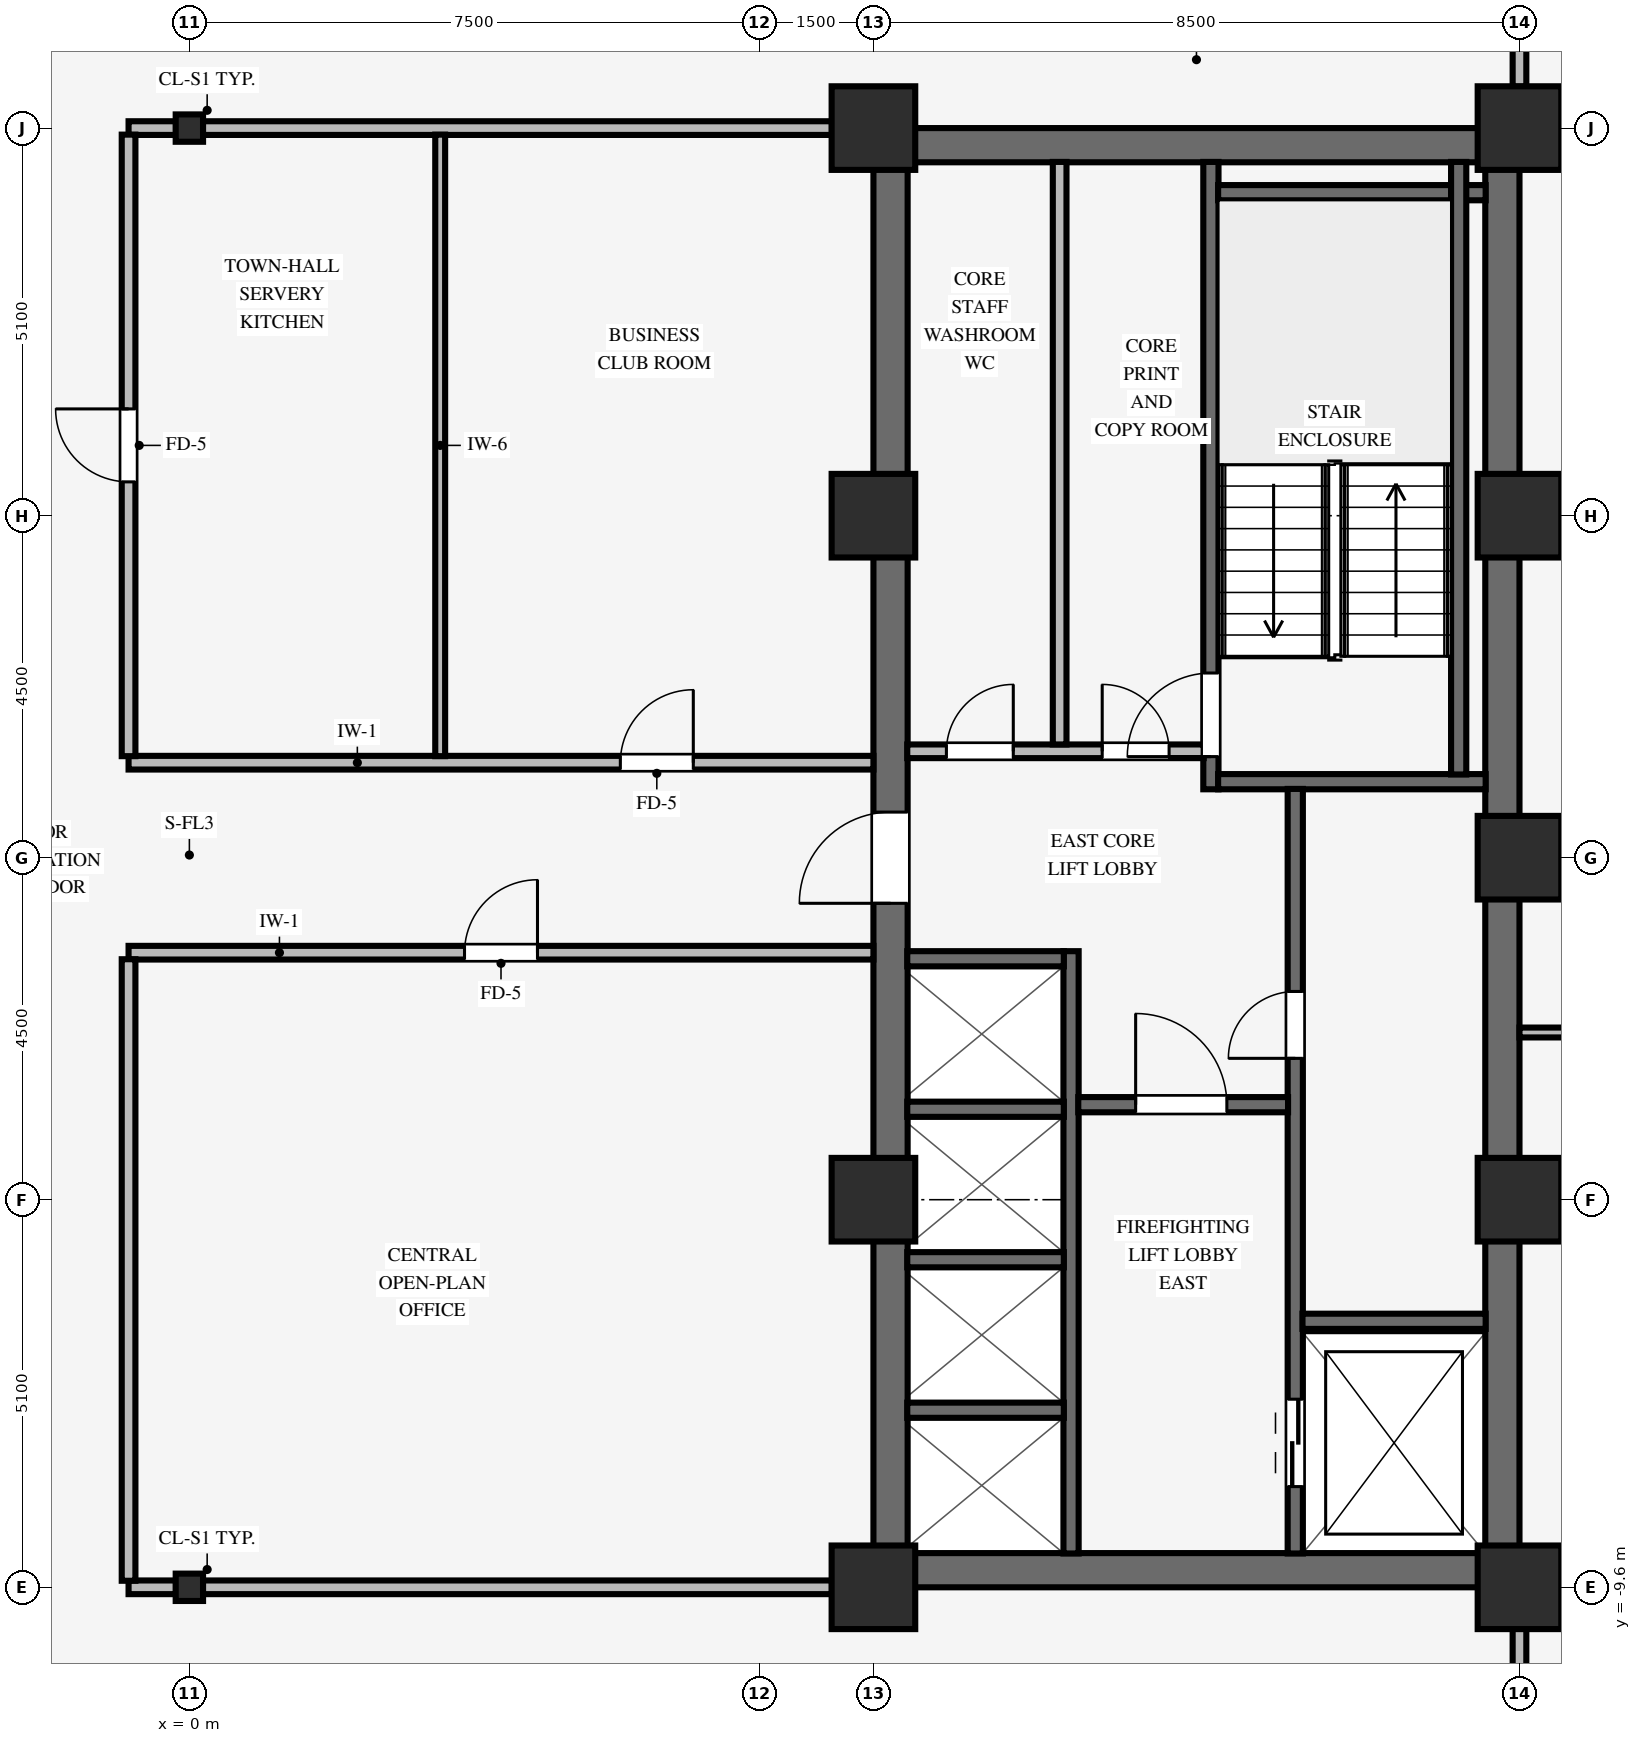
"""IFC4 building model, lengths in metres.
Left out: names, types, materials, properties, quantities, classifications, styles, units other than length and angle.
Written with IfcOpenShell. Run it as: python <this file> out.ifc"""

import sys

from ifc_helpers import new_model, si_unit, direction, frame, frame_2d, origin, origin_2d, place, context, subcontext, project, spatial, rectangle, i_section, extrude, source, transform, mapped, element, fill, save


model = new_model("IFC4")
c1 = context("Model", 3, precision=1e-05, world=origin(), true_north=direction((0.0, 1.0)))
c2 = subcontext(c1, "Body", "Model", "MODEL_VIEW")
j1 = project(units=[si_unit("LENGTHUNIT", "METRE"), si_unit("PLANEANGLEUNIT", "RADIAN")], contexts=[c1])
p1 = place(None, origin())
s1 = spatial("IfcSite", under=j1, at=p1, CompositionType="ELEMENT")
p2 = place(p1, origin())
s2 = spatial("IfcBuilding", under=s1, at=p2, CompositionType="ELEMENT")
p3 = place(p2, frame((0.0, 0.0, 56.8)))
s3 = spatial("IfcBuildingStorey", under=s2, at=p3, CompositionType="ELEMENT", Elevation=56.8)
for number, where, z_axis, x_axis in (
    (1, (9.0, -9.375, 0.0), (0.0, 0.0, 1.0), (1.0, 0.0, 0.0)),
    (2, (9.0, 9.375, 0.0), (0.0, 0.0, 1.0), (1.0, 0.0, 0.0)),
):
    element("IfcWall", number, at=place(p3, frame(where, z_axis=z_axis, x_axis=x_axis)), inside=s3, PredefinedType="SHEAR", context=c2, shape_type="SweptSolid", body=[
        extrude(rectangle(XDim=8.5, YDim=0.45, at=frame_2d((4.25, 0.0))), origin(), (0.0, 0.0, 1.0), 3.37),
    ])
p4 = place(p3, frame((9.225, -9.155, 0.0), z_axis=(0.0, 0.0, 1.0), x_axis=(0.0, 1.0, 0.0)))
e3 = element("IfcWall", 3, at=p4, inside=s3, PredefinedType="SHEAR", context=c2, shape_type="SweptSolid", body=[
    extrude(rectangle(XDim=18.31, YDim=0.45, at=frame_2d((9.155, 0.0))), origin(), (0.0, 0.0, 1.0), 3.37),
])
p5 = place(p4, frame((8.555, 0.0, 0.0)))
e4 = element("IfcOpeningElement", 4, at=p5, cuts=e3, PredefinedType="OPENING", context=c2, shape_type="SweptSolid", body=[
    extrude(rectangle(XDim=1.2, YDim=2.15, at=frame_2d((0.6, 1.075))), frame((0.0, 0.235, 0.0), z_axis=(0.0, -1.0, 0.0), x_axis=(1.0, 0.0, 0.0)), (0.0, 0.0, 1.0), 0.47),
])
p6 = place(p3, frame((17.275, -9.155, 0.0), z_axis=(0.0, 0.0, 1.0), x_axis=(0.0, 1.0, 0.0)))
e5 = element("IfcWall", 5, at=p6, inside=s3, PredefinedType="SHEAR", context=c2, shape_type="SweptSolid", body=[
    extrude(rectangle(XDim=18.31, YDim=0.45, at=frame_2d((9.155, 0.0))), origin(), (0.0, 0.0, 1.0), 3.37),
])
for number, where, z_axis, x_axis in (
    (6, (9.0, -9.6, 0.0), (0.0, 0.0, 1.0), (1.0, 0.0, 0.0)),
    (7, (9.0, -4.5, 0.0), (0.0, 0.0, 1.0), (1.0, 0.0, 0.0)),
    (8, (9.0, 4.5, 0.0), (0.0, 0.0, 1.0), (1.0, 0.0, 0.0)),
    (9, (9.0, 9.6, 0.0), (0.0, 0.0, 1.0), (1.0, 0.0, 0.0)),
    (10, (17.5, -9.6, 0.0), (0.0, 0.0, 1.0), (1.0, 0.0, 0.0)),
    (11, (17.5, -4.5, 0.0), (0.0, 0.0, 1.0), (1.0, 0.0, 0.0)),
    (12, (17.5, 4.5, 0.0), (0.0, 0.0, 1.0), (1.0, 0.0, 0.0)),
    (13, (17.5, 9.6, 0.0), (0.0, 0.0, 1.0), (1.0, 0.0, 0.0)),
    (14, (17.5, 0.0, 0.0), (0.0, 0.0, 1.0), (1.0, 0.0, 0.0)),
):
    element("IfcColumn", number, at=place(p3, frame(where, z_axis=z_axis, x_axis=x_axis)), inside=s3, PredefinedType="COLUMN", context=c2, shape_type="SweptSolid", body=[
        extrude(rectangle(XDim=1.1, YDim=1.1, at=origin_2d()), origin(), (0.0, 0.0, 1.0), 3.37),
    ])
for number, where, z_axis, x_axis in (
    (15, (0.0, -9.6, 0.0), (0.0, 0.0, 1.0), (1.0, 0.0, 0.0)),
    (16, (0.0, 9.6, 0.0), (0.0, 0.0, 1.0), (1.0, 0.0, 0.0)),
):
    element("IfcColumn", number, at=place(p3, frame(where, z_axis=z_axis, x_axis=x_axis)), inside=s3, PredefinedType="COLUMN", context=c2, shape_type="SweptSolid", body=[
        extrude(i_section(OverallWidth=0.36, OverallDepth=0.36, WebThickness=0.021, FlangeThickness=0.021, FilletRadius=0.018, at=origin_2d()), origin(), (0.0, 0.0, 1.0), 3.37),
    ])
p7 = place(p3, frame((13.44, 0.9, 0.0), z_axis=(0.0, 0.0, 1.0), x_axis=(0.0, 1.0, 0.0)))
e17 = element("IfcWall", 17, at=p7, inside=s3, PredefinedType="SHEAR", context=c2, shape_type="SweptSolid", body=[
    extrude(rectangle(XDim=8.255, YDim=0.2, at=frame_2d((4.127, 0.0))), origin(), (0.0, 0.0, 1.0), 3.37),
])
p8 = place(p7, frame((0.43, 0.0, 0.0)))
e18 = element("IfcOpeningElement", 18, at=p8, cuts=e17, PredefinedType="OPENING", context=c2, shape_type="SweptSolid", body=[
    extrude(rectangle(XDim=1.1, YDim=2.15, at=frame_2d((0.55, 1.075))), frame((0.0, 0.11, 0.0), z_axis=(0.0, -1.0, 0.0), x_axis=(1.0, 0.0, 0.0)), (0.0, 0.0, 1.0), 0.22),
])
for number, where, z_axis, x_axis in (
    (19, (13.535, 1.0, 0.0), (0.0, 0.0, 1.0), (1.0, 0.0, 0.0)),
    (20, (13.535, 8.75, 0.0), (0.0, 0.0, 1.0), (1.0, 0.0, 0.0)),
):
    element("IfcWall", number, at=place(p3, frame(where, z_axis=z_axis, x_axis=x_axis)), inside=s3, PredefinedType="SHEAR", context=c2, shape_type="SweptSolid", body=[
        extrude(rectangle(XDim=3.52, YDim=0.2, at=frame_2d((1.76, 0.0))), origin(), (0.0, 0.0, 1.0), 3.37),
    ])
p9 = place(p3, frame((16.7, 1.095, 0.0), z_axis=(0.0, 0.0, 1.0), x_axis=(0.0, 1.0, 0.0)))
e21 = element("IfcWall", 21, at=p9, inside=s3, PredefinedType="SHEAR", context=c2, shape_type="SweptSolid", body=[
    extrude(rectangle(XDim=8.06, YDim=0.2, at=frame_2d((4.03, 0.0))), origin(), (0.0, 0.0, 1.0), 3.37),
])
p10 = place(p3, frame((14.55, -9.155, 0.0), z_axis=(0.0, 0.0, 1.0), x_axis=(0.0, 1.0, 0.0)))
e22 = element("IfcWall", 22, at=p10, inside=s3, PredefinedType="SHEAR", context=c2, shape_type="SweptSolid", body=[
    extrude(rectangle(XDim=10.06, YDim=0.2, at=frame_2d((5.03, 0.0))), origin(), (0.0, 0.0, 1.0), 3.37),
])
p11 = place(p10, frame((6.515, 0.0, 0.0)))
e23 = element("IfcOpeningElement", 23, at=p11, cuts=e22, PredefinedType="OPENING", context=c2, shape_type="SweptSolid", body=[
    extrude(rectangle(XDim=0.88, YDim=2.1, at=frame_2d((0.44, 1.05))), frame((0.0, 0.11, 0.0), z_axis=(0.0, -1.0, 0.0), x_axis=(1.0, 0.0, 0.0)), (0.0, 0.0, 1.0), 0.22),
])
p12 = place(p10, frame((0.88, 0.0, 0.0)))
e24 = element("IfcOpeningElement", 24, at=p12, cuts=e22, PredefinedType="OPENING", context=c2, shape_type="SweptSolid", body=[
    extrude(rectangle(XDim=1.15, YDim=2.15, at=frame_2d((0.575, 1.075))), frame((0.0, 0.11, 0.0), z_axis=(0.0, -1.0, 0.0), x_axis=(1.0, 0.0, 0.0)), (0.0, 0.0, 1.0), 0.22),
])
p13 = place(p3, frame((14.645, -6.1, 0.0), z_axis=(0.0, 0.0, 1.0), x_axis=(1.0, 0.0, 0.0)))
e25 = element("IfcWall", 25, at=p13, inside=s3, PredefinedType="SHEAR", context=c2, shape_type="SweptSolid", body=[
    extrude(rectangle(XDim=2.41, YDim=0.2, at=frame_2d((1.205, 0.0))), origin(), (0.0, 0.0, 1.0), 3.37),
])
p14 = place(p3, frame((11.6, -9.155, 0.0), z_axis=(0.0, 0.0, 1.0), x_axis=(0.0, 1.0, 0.0)))
e26 = element("IfcWall", 26, at=p14, inside=s3, PredefinedType="SHEAR", context=c2, shape_type="SweptSolid", body=[
    extrude(rectangle(XDim=7.925, YDim=0.2, at=frame_2d((3.962, 0.0))), origin(), (0.0, 0.0, 1.0), 3.37),
])
p15 = place(p3, frame((11.695, -3.25, 0.0), z_axis=(0.0, 0.0, 1.0), x_axis=(1.0, 0.0, 0.0)))
e27 = element("IfcWall", 27, at=p15, inside=s3, PredefinedType="SHEAR", context=c2, shape_type="SweptSolid", body=[
    extrude(rectangle(XDim=2.76, YDim=0.2, at=frame_2d((1.38, 0.0))), origin(), (0.0, 0.0, 1.0), 3.37),
])
p16 = place(p15, frame((0.755, 0.0, 0.0)))
e28 = element("IfcOpeningElement", 28, at=p16, cuts=e27, PredefinedType="OPENING", context=c2, shape_type="SweptSolid", body=[
    extrude(rectangle(XDim=1.2, YDim=2.15, at=frame_2d((0.6, 1.075))), frame((0.0, 0.11, 0.0), z_axis=(0.0, -1.0, 0.0), x_axis=(1.0, 0.0, 0.0)), (0.0, 0.0, 1.0), 0.22),
])
for number, where, z_axis, x_axis in (
    (29, (9.445, -7.27, 0.0), (0.0, 0.0, 1.0), (1.0, 0.0, 0.0)),
    (30, (9.445, -5.29, 0.0), (0.0, 0.0, 1.0), (1.0, 0.0, 0.0)),
    (31, (9.445, -3.31, 0.0), (0.0, 0.0, 1.0), (1.0, 0.0, 0.0)),
    (32, (9.445, -1.33, 0.0), (0.0, 0.0, 1.0), (1.0, 0.0, 0.0)),
):
    element("IfcWall", number, at=place(p3, frame(where, z_axis=z_axis, x_axis=x_axis)), inside=s3, PredefinedType="SHEAR", context=c2, shape_type="SweptSolid", body=[
        extrude(rectangle(XDim=2.06, YDim=0.2, at=frame_2d((1.03, 0.0))), origin(), (0.0, 0.0, 1.0), 3.37),
    ])
p17 = place(p3, frame((9.445, 1.4, 0.0), z_axis=(0.0, 0.0, 1.0), x_axis=(1.0, 0.0, 0.0)))
e33 = element("IfcWall", 33, at=p17, inside=s3, PredefinedType="PARTITIONING", context=c2, shape_type="SweptSolid", body=[
    extrude(rectangle(XDim=3.9, YDim=0.18, at=frame_2d((1.95, 0.0))), origin(), (0.0, 0.0, 1.0), 3.36),
])
p18 = place(p17, frame((0.515, 0.0, 0.0)))
e34 = element("IfcOpeningElement", 34, at=p18, cuts=e33, PredefinedType="OPENING", context=c2, shape_type="SweptSolid", body=[
    extrude(rectangle(XDim=0.88, YDim=2.1, at=frame_2d((0.44, 1.05))), frame((0.0, 0.1, 0.0), z_axis=(0.0, -1.0, 0.0), x_axis=(1.0, 0.0, 0.0)), (0.0, 0.0, 1.0), 0.2),
])
p19 = place(p17, frame((2.565, 0.0, 0.0)))
e35 = element("IfcOpeningElement", 35, at=p19, cuts=e33, PredefinedType="OPENING", context=c2, shape_type="SweptSolid", body=[
    extrude(rectangle(XDim=0.88, YDim=2.1, at=frame_2d((0.44, 1.05))), frame((0.0, 0.1, 0.0), z_axis=(0.0, -1.0, 0.0), x_axis=(1.0, 0.0, 0.0)), (0.0, 0.0, 1.0), 0.2),
])
p20 = place(p3, frame((11.45, 1.49, 0.0), z_axis=(0.0, 0.0, 1.0), x_axis=(0.0, 1.0, 0.0)))
e36 = element("IfcWall", 36, at=p20, inside=s3, PredefinedType="PARTITIONING", context=c2, shape_type="SweptSolid", body=[
    extrude(rectangle(XDim=7.665, YDim=0.18, at=frame_2d((3.833, 0.0))), origin(), (0.0, 0.0, 1.0), 3.36),
])
p21 = place(p3, frame((-0.8, -9.6, 0.0), z_axis=(0.0, 0.0, 1.0), x_axis=(1.0, 0.0, 0.0)))
e37 = element("IfcWall", 37, at=p21, inside=s3, PredefinedType="PARTITIONING", context=c2, shape_type="SweptSolid", body=[
    extrude(rectangle(XDim=0.624, YDim=0.18, at=frame_2d((0.312, 0.0))), origin(), (0.0, 0.0, 1.0), 2.405),
])
p22 = place(p3, frame((0.176, -9.6, 0.0), z_axis=(0.0, 0.0, 1.0), x_axis=(1.0, 0.0, 0.0)))
e38 = element("IfcWall", 38, at=p22, inside=s3, PredefinedType="PARTITIONING", context=c2, shape_type="SweptSolid", body=[
    extrude(rectangle(XDim=8.278, YDim=0.18, at=frame_2d((4.139, 0.0))), origin(), (0.0, 0.0, 1.0), 2.405),
])
p23 = place(p3, frame((17.5, -2.3, 0.0), z_axis=(0.0, 0.0, 1.0), x_axis=(1.0, 0.0, 0.0)))
e39 = element("IfcWall", 39, at=p23, inside=s3, PredefinedType="PARTITIONING", context=c2, shape_type="SweptSolid", body=[
    extrude(rectangle(XDim=3.66, YDim=0.13, at=frame_2d((1.83, 0.0))), origin(), (0.0, 0.0, 1.0), 3.36),
])
p24 = place(p3, frame((-0.8, -1.25, 0.0), z_axis=(0.0, 0.0, 1.0), x_axis=(1.0, 0.0, 0.0)))
e40 = element("IfcWall", 40, at=p24, inside=s3, PredefinedType="PARTITIONING", context=c2, shape_type="SweptSolid", body=[
    extrude(rectangle(XDim=9.8, YDim=0.18, at=frame_2d((4.9, 0.0))), origin(), (0.0, 0.0, 1.0), 3.36),
])
p25 = place(p24, frame((4.42, 0.0, 0.0)))
e41 = element("IfcOpeningElement", 41, at=p25, cuts=e40, PredefinedType="OPENING", context=c2, shape_type="SweptSolid", body=[
    extrude(rectangle(XDim=0.96, YDim=2.1, at=frame_2d((0.48, 1.05))), frame((0.0, 0.1, 0.0), z_axis=(0.0, -1.0, 0.0), x_axis=(1.0, 0.0, 0.0)), (0.0, 0.0, 1.0), 0.2),
])
p26 = place(p3, frame((-0.8, 1.25, 0.0), z_axis=(0.0, 0.0, 1.0), x_axis=(1.0, 0.0, 0.0)))
e42 = element("IfcWall", 42, at=p26, inside=s3, PredefinedType="PARTITIONING", context=c2, shape_type="SweptSolid", body=[
    extrude(rectangle(XDim=9.8, YDim=0.18, at=frame_2d((4.9, 0.0))), origin(), (0.0, 0.0, 1.0), 3.36),
])
p27 = place(p26, frame((6.47, 0.0, 0.0)))
e43 = element("IfcOpeningElement", 43, at=p27, cuts=e42, PredefinedType="OPENING", context=c2, shape_type="SweptSolid", body=[
    extrude(rectangle(XDim=0.96, YDim=2.1, at=frame_2d((0.48, 1.05))), frame((0.0, 0.1, 0.0), z_axis=(0.0, -1.0, 0.0), x_axis=(1.0, 0.0, 0.0)), (0.0, 0.0, 1.0), 0.2),
])
p28 = place(p3, frame((-0.8, 9.6, 0.0), z_axis=(0.0, 0.0, 1.0), x_axis=(1.0, 0.0, 0.0)))
e44 = element("IfcWall", 44, at=p28, inside=s3, PredefinedType="PARTITIONING", context=c2, shape_type="SweptSolid", body=[
    extrude(rectangle(XDim=0.624, YDim=0.18, at=frame_2d((0.312, 0.0))), origin(), (0.0, 0.0, 1.0), 2.405),
])
p29 = place(p3, frame((0.176, 9.6, 0.0), z_axis=(0.0, 0.0, 1.0), x_axis=(1.0, 0.0, 0.0)))
e45 = element("IfcWall", 45, at=p29, inside=s3, PredefinedType="PARTITIONING", context=c2, shape_type="SweptSolid", body=[
    extrude(rectangle(XDim=8.278, YDim=0.18, at=frame_2d((4.139, 0.0))), origin(), (0.0, 0.0, 1.0), 2.405),
])
p30 = place(p3, frame((-0.8, -9.514, 0.0), z_axis=(0.0, 0.0, 1.0), x_axis=(0.0, 1.0, 0.0)))
e46 = element("IfcWall", 46, at=p30, inside=s3, PredefinedType="PARTITIONING", context=c2, shape_type="SweptSolid", body=[
    extrude(rectangle(XDim=8.178, YDim=0.18, at=frame_2d((4.089, 0.0))), origin(), (0.0, 0.0, 1.0), 3.36),
])
p31 = place(p3, frame((-0.8, 1.336, 0.0), z_axis=(0.0, 0.0, 1.0), x_axis=(0.0, 1.0, 0.0)))
e47 = element("IfcWall", 47, at=p31, inside=s3, PredefinedType="PARTITIONING", context=c2, shape_type="SweptSolid", body=[
    extrude(rectangle(XDim=8.178, YDim=0.18, at=frame_2d((4.089, 0.0))), origin(), (0.0, 0.0, 1.0), 3.36),
])
p32 = place(p31, frame((3.609, 0.0, 0.0)))
e48 = element("IfcOpeningElement", 48, at=p32, cuts=e47, PredefinedType="OPENING", context=c2, shape_type="SweptSolid", body=[
    extrude(rectangle(XDim=0.96, YDim=2.1, at=frame_2d((0.48, 1.05))), frame((0.0, 0.1, 0.0), z_axis=(0.0, -1.0, 0.0), x_axis=(1.0, 0.0, 0.0)), (0.0, 0.0, 1.0), 0.2),
])
p33 = place(p3, frame((3.3, 1.336, 0.0), z_axis=(0.0, 0.0, 1.0), x_axis=(0.0, 1.0, 0.0)))
e49 = element("IfcWall", 49, at=p33, inside=s3, PredefinedType="PARTITIONING", context=c2, shape_type="SweptSolid", body=[
    extrude(rectangle(XDim=8.178, YDim=0.13, at=frame_2d((4.089, 0.0))), origin(), (0.0, 0.0, 1.0), 3.36),
])
for number, where, z_axis, x_axis in (
    (50, (17.5, -11.114, 0.0), (0.0, 0.0, 1.0), (0.0, 1.0, 0.0)),
    (51, (17.5, 10.146, 0.0), (0.0, 0.0, 1.0), (0.0, 1.0, 0.0)),
):
    element("IfcWall", number, at=place(p3, frame(where, z_axis=z_axis, x_axis=x_axis)), inside=s3, PredefinedType="PARTITIONING", context=c2, shape_type="SweptSolid", body=[
        extrude(rectangle(XDim=0.968, YDim=0.18, at=frame_2d((0.484, 0.0))), origin(), (0.0, 0.0, 1.0), 2.738),
    ])
m1 = source(origin(), c2, "Body", "SweptSolid", [
    extrude(rectangle(XDim=1.1, YDim=2.15, at=frame_2d((0.55, 1.075))), frame((0.0, 0.025, 0.0), z_axis=(0.0, -1.0, 0.0), x_axis=(1.0, 0.0, 0.0)), (0.0, 0.0, 1.0), 0.05),
])
p34 = place(p8, origin())
e52 = element("IfcDoor", 52, at=p34, inside=s3, OperationType="SINGLE_SWING_LEFT", PredefinedType="DOOR", context=c2, shape_type="MappedRepresentation", body=[
    mapped(m1, transform((0.0, 0.0, 0.0), scale=1.0)),
])
fill(e18, e52)
m2 = source(origin(), c2, "Body", "SweptSolid", [
    extrude(rectangle(XDim=0.88, YDim=2.1, at=frame_2d((0.44, 1.05))), frame((0.0, 0.025, 0.0), z_axis=(0.0, -1.0, 0.0), x_axis=(1.0, 0.0, 0.0)), (0.0, 0.0, 1.0), 0.05),
])
p35 = place(p11, origin())
e53 = element("IfcDoor", 53, at=p35, inside=s3, OperationType="SINGLE_SWING_LEFT", PredefinedType="DOOR", context=c2, shape_type="MappedRepresentation", body=[
    mapped(m2, transform((0.0, 0.0, 0.0), scale=1.0)),
])
fill(e23, e53)
m3 = source(origin(), c2, "Body", "SweptSolid", [
    extrude(rectangle(XDim=1.2, YDim=2.15, at=frame_2d((0.6, 1.075))), frame((0.0, 0.025, 0.0), z_axis=(0.0, -1.0, 0.0), x_axis=(1.0, 0.0, 0.0)), (0.0, 0.0, 1.0), 0.05),
])
p36 = place(p16, origin())
e54 = element("IfcDoor", 54, at=p36, inside=s3, OperationType="SINGLE_SWING_LEFT", PredefinedType="DOOR", context=c2, shape_type="MappedRepresentation", body=[
    mapped(m3, transform((0.0, 0.0, 0.0), scale=1.0)),
])
fill(e28, e54)
p37 = place(p5, origin())
e55 = element("IfcDoor", 55, at=p37, inside=s3, OperationType="SINGLE_SWING_LEFT", PredefinedType="DOOR", context=c2, shape_type="MappedRepresentation", body=[
    mapped(m3, transform((0.0, 0.0, 0.0), scale=1.0)),
])
fill(e4, e55)
p38 = place(p18, origin())
e56 = element("IfcDoor", 56, at=p38, inside=s3, OperationType="SINGLE_SWING_RIGHT", PredefinedType="DOOR", context=c2, shape_type="MappedRepresentation", body=[
    mapped(m2, transform((0.0, 0.0, 0.0), scale=1.0)),
])
fill(e34, e56)
p39 = place(p19, origin())
e57 = element("IfcDoor", 57, at=p39, inside=s3, OperationType="SINGLE_SWING_LEFT", PredefinedType="DOOR", context=c2, shape_type="MappedRepresentation", body=[
    mapped(m2, transform((0.0, 0.0, 0.0), scale=1.0)),
])
fill(e35, e57)
m4 = source(origin(), c2, "Body", "SweptSolid", [
    extrude(rectangle(XDim=1.15, YDim=2.15, at=frame_2d((0.575, 1.075))), frame((0.0, 0.025, 0.0), z_axis=(0.0, -1.0, 0.0), x_axis=(1.0, 0.0, 0.0)), (0.0, 0.0, 1.0), 0.05),
])
p40 = place(p12, origin())
e58 = element("IfcDoor", 58, at=p40, inside=s3, OperationType="DOUBLE_DOOR_SLIDING", PredefinedType="DOOR", context=c2, shape_type="MappedRepresentation", body=[
    mapped(m4, transform((0.0, 0.0, 0.0), scale=1.0)),
])
fill(e24, e58)
m5 = source(origin(), c2, "Body", "SweptSolid", [
    extrude(rectangle(XDim=0.96, YDim=2.1, at=frame_2d((0.48, 1.05))), frame((0.0, 0.025, 0.0), z_axis=(0.0, -1.0, 0.0), x_axis=(1.0, 0.0, 0.0)), (0.0, 0.0, 1.0), 0.05),
])
p41 = place(p25, origin())
e59 = element("IfcDoor", 59, at=p41, inside=s3, OperationType="SINGLE_SWING_RIGHT", PredefinedType="DOOR", context=c2, shape_type="MappedRepresentation", body=[
    mapped(m5, transform((0.0, 0.0, 0.0), scale=1.0)),
])
fill(e41, e59)
p42 = place(p32, origin())
e60 = element("IfcDoor", 60, at=p42, inside=s3, OperationType="SINGLE_SWING_RIGHT", PredefinedType="DOOR", context=c2, shape_type="MappedRepresentation", body=[
    mapped(m5, transform((0.0, 0.0, 0.0), scale=1.0)),
])
fill(e48, e60)
p43 = place(p27, origin())
e61 = element("IfcDoor", 61, at=p43, inside=s3, OperationType="SINGLE_SWING_RIGHT", PredefinedType="DOOR", context=c2, shape_type="MappedRepresentation", body=[
    mapped(m5, transform((0.0, 0.0, 0.0), scale=1.0)),
])
fill(e43, e61)
save(model, sys.argv[1])
